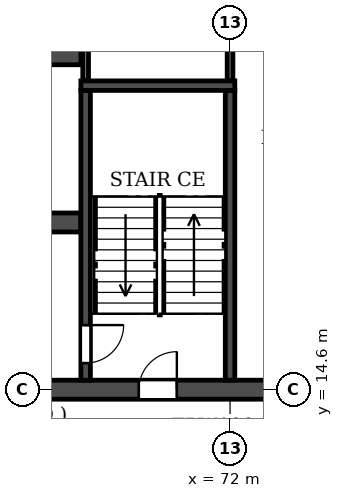
"""IFC4 building model, lengths in metres.
Left out: names, types, materials, properties, quantities, classifications, styles, units other than length and angle.
Written with IfcOpenShell. Run it as: python <this file> out.ifc"""

import sys

from ifc_helpers import new_model, si_unit, direction, frame, frame_2d, origin, place, context, subcontext, project, spatial, rectangle, extrude, element, fill, save


model = new_model("IFC4")
c1 = context("Model", 3, precision=1e-05, world=origin(), true_north=direction((0.0, 1.0)))
c2 = subcontext(c1, "Body", "Model", "MODEL_VIEW")
j1 = project(units=[si_unit("LENGTHUNIT", "METRE"), si_unit("PLANEANGLEUNIT", "RADIAN")], contexts=[c1])
p1 = place(None, origin())
s1 = spatial("IfcSite", under=j1, at=p1, CompositionType="ELEMENT")
p2 = place(p1, origin())
s2 = spatial("IfcBuilding", under=s1, at=p2, CompositionType="ELEMENT")
p3 = place(p2, frame((0.0, 0.0, 92.7)))
s3 = spatial("IfcBuildingStorey", under=s2, at=p3, CompositionType="ELEMENT", Elevation=92.7)
p4 = place(p3, frame((8.6, 14.6, 0.0), z_axis=(0.0, 0.0, 1.0), x_axis=(1.0, 0.0, 0.0)))
e1 = element("IfcWall", 1, at=p4, inside=s3, PredefinedType="SOLIDWALL", context=c2, shape_type="SweptSolid", body=[
    extrude(rectangle(XDim=84.8, YDim=0.5, at=frame_2d((42.4, 0.0))), origin(), (0.0, 0.0, 1.0), 3.06),
])
p5 = place(p4, frame((4.2, 0.0, 0.0)))
e2 = element("IfcOpeningElement", 2, at=p5, cuts=e1, PredefinedType="OPENING", context=c2, shape_type="SweptSolid", body=[
    extrude(rectangle(XDim=1.0, YDim=2.1, at=frame_2d((0.5, 1.05))), frame((0.0, 0.26, 0.0), z_axis=(0.0, -1.0, 0.0), x_axis=(1.0, 0.0, 0.0)), (0.0, 0.0, 1.0), 0.52),
])
p6 = place(p4, frame((10.3, 0.0, 0.0)))
e3 = element("IfcOpeningElement", 3, at=p6, cuts=e1, PredefinedType="OPENING", context=c2, shape_type="SweptSolid", body=[
    extrude(rectangle(XDim=1.0, YDim=2.1, at=frame_2d((0.5, 1.05))), frame((0.0, 0.26, 0.0), z_axis=(0.0, -1.0, 0.0), x_axis=(1.0, 0.0, 0.0)), (0.0, 0.0, 1.0), 0.52),
])
p7 = place(p4, frame((18.2, 0.0, 0.0)))
e4 = element("IfcOpeningElement", 4, at=p7, cuts=e1, PredefinedType="OPENING", context=c2, shape_type="SweptSolid", body=[
    extrude(rectangle(XDim=1.0, YDim=2.1, at=frame_2d((0.5, 1.05))), frame((0.0, 0.26, 0.0), z_axis=(0.0, -1.0, 0.0), x_axis=(1.0, 0.0, 0.0)), (0.0, 0.0, 1.0), 0.52),
])
p8 = place(p4, frame((22.8, 0.0, 0.0)))
e5 = element("IfcOpeningElement", 5, at=p8, cuts=e1, PredefinedType="OPENING", context=c2, shape_type="SweptSolid", body=[
    extrude(rectangle(XDim=1.0, YDim=2.1, at=frame_2d((0.5, 1.05))), frame((0.0, 0.26, 0.0), z_axis=(0.0, -1.0, 0.0), x_axis=(1.0, 0.0, 0.0)), (0.0, 0.0, 1.0), 0.52),
])
p9 = place(p4, frame((34.1, 0.0, 0.0)))
e6 = element("IfcOpeningElement", 6, at=p9, cuts=e1, PredefinedType="OPENING", context=c2, shape_type="SweptSolid", body=[
    extrude(rectangle(XDim=1.0, YDim=2.1, at=frame_2d((0.5, 1.05))), frame((0.0, 0.26, 0.0), z_axis=(0.0, -1.0, 0.0), x_axis=(1.0, 0.0, 0.0)), (0.0, 0.0, 1.0), 0.52),
])
p10 = place(p4, frame((38.0, 0.0, 0.0)))
e7 = element("IfcOpeningElement", 7, at=p10, cuts=e1, PredefinedType="OPENING", context=c2, shape_type="SweptSolid", body=[
    extrude(rectangle(XDim=1.0, YDim=2.1, at=frame_2d((0.5, 1.05))), frame((0.0, 0.26, 0.0), z_axis=(0.0, -1.0, 0.0), x_axis=(1.0, 0.0, 0.0)), (0.0, 0.0, 1.0), 0.52),
])
p11 = place(p4, frame((41.9, 0.0, 0.0)))
e8 = element("IfcOpeningElement", 8, at=p11, cuts=e1, PredefinedType="OPENING", context=c2, shape_type="SweptSolid", body=[
    extrude(rectangle(XDim=1.0, YDim=2.1, at=frame_2d((0.5, 1.05))), frame((0.0, 0.26, 0.0), z_axis=(0.0, -1.0, 0.0), x_axis=(1.0, 0.0, 0.0)), (0.0, 0.0, 1.0), 0.52),
])
p12 = place(p4, frame((47.1, 0.0, 0.0)))
e9 = element("IfcOpeningElement", 9, at=p12, cuts=e1, PredefinedType="OPENING", context=c2, shape_type="SweptSolid", body=[
    extrude(rectangle(XDim=1.0, YDim=2.1, at=frame_2d((0.5, 1.05))), frame((0.0, 0.26, 0.0), z_axis=(0.0, -1.0, 0.0), x_axis=(1.0, 0.0, 0.0)), (0.0, 0.0, 1.0), 0.52),
])
p13 = place(p4, frame((61.0, 0.0, 0.0)))
e10 = element("IfcOpeningElement", 10, at=p13, cuts=e1, PredefinedType="OPENING", context=c2, shape_type="SweptSolid", body=[
    extrude(rectangle(XDim=1.0, YDim=2.1, at=frame_2d((0.5, 1.05))), frame((0.0, 0.26, 0.0), z_axis=(0.0, -1.0, 0.0), x_axis=(1.0, 0.0, 0.0)), (0.0, 0.0, 1.0), 0.52),
])
p14 = place(p4, frame((65.6, 0.0, 0.0)))
e11 = element("IfcOpeningElement", 11, at=p14, cuts=e1, PredefinedType="OPENING", context=c2, shape_type="SweptSolid", body=[
    extrude(rectangle(XDim=1.0, YDim=2.1, at=frame_2d((0.5, 1.05))), frame((0.0, 0.26, 0.0), z_axis=(0.0, -1.0, 0.0), x_axis=(1.0, 0.0, 0.0)), (0.0, 0.0, 1.0), 0.52),
])
p15 = place(p4, frame((73.5, 0.0, 0.0)))
e12 = element("IfcOpeningElement", 12, at=p15, cuts=e1, PredefinedType="OPENING", context=c2, shape_type="SweptSolid", body=[
    extrude(rectangle(XDim=1.0, YDim=2.1, at=frame_2d((0.5, 1.05))), frame((0.0, 0.26, 0.0), z_axis=(0.0, -1.0, 0.0), x_axis=(1.0, 0.0, 0.0)), (0.0, 0.0, 1.0), 0.52),
])
p16 = place(p4, frame((76.25, 0.0, 0.0)))
e13 = element("IfcOpeningElement", 13, at=p16, cuts=e1, PredefinedType="OPENING", context=c2, shape_type="SweptSolid", body=[
    extrude(rectangle(XDim=1.0, YDim=2.1, at=frame_2d((0.5, 1.05))), frame((0.0, 0.26, 0.0), z_axis=(0.0, -1.0, 0.0), x_axis=(1.0, 0.0, 0.0)), (0.0, 0.0, 1.0), 0.52),
])
p17 = place(p4, frame((80.95, 0.0, 0.0)))
e14 = element("IfcOpeningElement", 14, at=p17, cuts=e1, PredefinedType="OPENING", context=c2, shape_type="SweptSolid", body=[
    extrude(rectangle(XDim=1.0, YDim=2.1, at=frame_2d((0.5, 1.05))), frame((0.0, 0.26, 0.0), z_axis=(0.0, -1.0, 0.0), x_axis=(1.0, 0.0, 0.0)), (0.0, 0.0, 1.0), 0.52),
])
p18 = place(p3, frame((33.925, 19.0, 0.0), z_axis=(0.0, 0.0, 1.0), x_axis=(1.0, 0.0, 0.0)))
e15 = element("IfcWall", 15, at=p18, inside=s3, PredefinedType="SOLIDWALL", context=c2, shape_type="SweptSolid", body=[
    extrude(rectangle(XDim=34.15, YDim=0.5, at=frame_2d((17.075, 0.0))), origin(), (0.0, 0.0, 1.0), 3.06),
])
p19 = place(p18, frame((16.175, 0.0, 0.0)))
e16 = element("IfcOpeningElement", 16, at=p19, cuts=e15, PredefinedType="OPENING", context=c2, shape_type="SweptSolid", body=[
    extrude(rectangle(XDim=1.8, YDim=2.1, at=frame_2d((0.9, 1.05))), frame((0.0, 0.26, 0.0), z_axis=(0.0, -1.0, 0.0), x_axis=(1.0, 0.0, 0.0)), (0.0, 0.0, 1.0), 0.52),
])
p20 = place(p18, frame((1.525, 0.0, 0.0)))
e17 = element("IfcOpeningElement", 17, at=p20, cuts=e15, PredefinedType="OPENING", context=c2, shape_type="SweptSolid", body=[
    extrude(rectangle(XDim=1.8, YDim=2.1, at=frame_2d((0.9, 1.05))), frame((0.0, 0.26, 0.0), z_axis=(0.0, -1.0, 0.0), x_axis=(1.0, 0.0, 0.0)), (0.0, 0.0, 1.0), 0.52),
])
p21 = place(p18, frame((8.725, 0.0, 0.0)))
e18 = element("IfcOpeningElement", 18, at=p21, cuts=e15, PredefinedType="OPENING", context=c2, shape_type="SweptSolid", body=[
    extrude(rectangle(XDim=1.1, YDim=2.1, at=frame_2d((0.55, 1.05))), frame((0.0, 0.26, 0.0), z_axis=(0.0, -1.0, 0.0), x_axis=(1.0, 0.0, 0.0)), (0.0, 0.0, 1.0), 0.52),
])
p22 = place(p18, frame((11.325, 0.0, 0.0)))
e19 = element("IfcOpeningElement", 19, at=p22, cuts=e15, PredefinedType="OPENING", context=c2, shape_type="SweptSolid", body=[
    extrude(rectangle(XDim=1.1, YDim=2.1, at=frame_2d((0.55, 1.05))), frame((0.0, 0.26, 0.0), z_axis=(0.0, -1.0, 0.0), x_axis=(1.0, 0.0, 0.0)), (0.0, 0.0, 1.0), 0.52),
])
p23 = place(p18, frame((13.925, 0.0, 0.0)))
e20 = element("IfcOpeningElement", 20, at=p23, cuts=e15, PredefinedType="OPENING", context=c2, shape_type="SweptSolid", body=[
    extrude(rectangle(XDim=1.1, YDim=2.1, at=frame_2d((0.55, 1.05))), frame((0.0, 0.26, 0.0), z_axis=(0.0, -1.0, 0.0), x_axis=(1.0, 0.0, 0.0)), (0.0, 0.0, 1.0), 0.52),
])
p24 = place(p18, frame((19.125, 0.0, 0.0)))
e21 = element("IfcOpeningElement", 21, at=p24, cuts=e15, PredefinedType="OPENING", context=c2, shape_type="SweptSolid", body=[
    extrude(rectangle(XDim=1.1, YDim=2.1, at=frame_2d((0.55, 1.05))), frame((0.0, 0.26, 0.0), z_axis=(0.0, -1.0, 0.0), x_axis=(1.0, 0.0, 0.0)), (0.0, 0.0, 1.0), 0.52),
])
p25 = place(p18, frame((21.725, 0.0, 0.0)))
e22 = element("IfcOpeningElement", 22, at=p25, cuts=e15, PredefinedType="OPENING", context=c2, shape_type="SweptSolid", body=[
    extrude(rectangle(XDim=1.1, YDim=2.1, at=frame_2d((0.55, 1.05))), frame((0.0, 0.26, 0.0), z_axis=(0.0, -1.0, 0.0), x_axis=(1.0, 0.0, 0.0)), (0.0, 0.0, 1.0), 0.52),
])
p26 = place(p18, frame((24.325, 0.0, 0.0)))
e23 = element("IfcOpeningElement", 23, at=p26, cuts=e15, PredefinedType="OPENING", context=c2, shape_type="SweptSolid", body=[
    extrude(rectangle(XDim=1.1, YDim=2.1, at=frame_2d((0.55, 1.05))), frame((0.0, 0.26, 0.0), z_axis=(0.0, -1.0, 0.0), x_axis=(1.0, 0.0, 0.0)), (0.0, 0.0, 1.0), 0.52),
])
p27 = place(p18, frame((30.825, 0.0, 0.0)))
e24 = element("IfcOpeningElement", 24, at=p27, cuts=e15, PredefinedType="OPENING", context=c2, shape_type="SweptSolid", body=[
    extrude(rectangle(XDim=1.8, YDim=2.1, at=frame_2d((0.9, 1.05))), frame((0.0, 0.26, 0.0), z_axis=(0.0, -1.0, 0.0), x_axis=(1.0, 0.0, 0.0)), (0.0, 0.0, 1.0), 0.52),
])
p28 = place(p3, frame((33.925, 23.4, 0.0), z_axis=(0.0, 0.0, 1.0), x_axis=(1.0, 0.0, 0.0)))
e25 = element("IfcWall", 25, at=p28, inside=s3, PredefinedType="SOLIDWALL", context=c2, shape_type="SweptSolid", body=[
    extrude(rectangle(XDim=34.15, YDim=0.5, at=frame_2d((17.075, 0.0))), origin(), (0.0, 0.0, 1.0), 3.06),
])
p29 = place(p28, frame((16.175, 0.0, 0.0)))
e26 = element("IfcOpeningElement", 26, at=p29, cuts=e25, PredefinedType="OPENING", context=c2, shape_type="SweptSolid", body=[
    extrude(rectangle(XDim=1.8, YDim=2.1, at=frame_2d((0.9, 1.05))), frame((0.0, 0.26, 0.0), z_axis=(0.0, -1.0, 0.0), x_axis=(1.0, 0.0, 0.0)), (0.0, 0.0, 1.0), 0.52),
])
p30 = place(p28, frame((11.025, 0.0, 0.0)))
e27 = element("IfcOpeningElement", 27, at=p30, cuts=e25, PredefinedType="OPENING", context=c2, shape_type="SweptSolid", body=[
    extrude(rectangle(XDim=1.1, YDim=2.1, at=frame_2d((0.55, 1.05))), frame((0.0, 0.26, 0.0), z_axis=(0.0, -1.0, 0.0), x_axis=(1.0, 0.0, 0.0)), (0.0, 0.0, 1.0), 0.52),
])
p31 = place(p3, frame((68.2, 14.85, 0.0), z_axis=(0.0, 0.0, 1.0), x_axis=(0.0, 1.0, 0.0)))
e28 = element("IfcWall", 28, at=p31, inside=s3, PredefinedType="SOLIDWALL", context=c2, shape_type="SweptSolid", body=[
    extrude(rectangle(XDim=7.625, YDim=0.25, at=frame_2d((3.812, 0.0))), origin(), (0.0, 0.0, 1.0), 3.06),
])
p32 = place(p31, frame((0.45, 0.0, 0.0)))
e29 = element("IfcOpeningElement", 29, at=p32, cuts=e28, PredefinedType="OPENING", context=c2, shape_type="SweptSolid", body=[
    extrude(rectangle(XDim=1.0, YDim=2.1, at=frame_2d((0.5, 1.05))), frame((0.0, 0.135, 0.0), z_axis=(0.0, -1.0, 0.0), x_axis=(1.0, 0.0, 0.0)), (0.0, 0.0, 1.0), 0.27),
])
p33 = place(p3, frame((72.0, 14.85, 0.0), z_axis=(0.0, 0.0, 1.0), x_axis=(0.0, 1.0, 0.0)))
e30 = element("IfcWall", 30, at=p33, inside=s3, PredefinedType="SOLIDWALL", context=c2, shape_type="SweptSolid", body=[
    extrude(rectangle(XDim=7.625, YDim=0.25, at=frame_2d((3.812, 0.0))), origin(), (0.0, 0.0, 1.0), 3.06),
])
p34 = place(p3, frame((68.075, 22.6, 0.0), z_axis=(0.0, 0.0, 1.0), x_axis=(1.0, 0.0, 0.0)))
e31 = element("IfcWall", 31, at=p34, inside=s3, PredefinedType="SOLIDWALL", context=c2, shape_type="SweptSolid", body=[
    extrude(rectangle(XDim=4.05, YDim=0.25, at=frame_2d((2.025, 0.0))), origin(), (0.0, 0.0, 1.0), 3.06),
])
for number, where, z_axis, x_axis in (
    (32, (68.2, 22.735, 0.0), (0.0, 0.0, 1.0), (0.0, 1.0, 0.0)),
    (33, (72.0, 22.735, 0.0), (0.0, 0.0, 1.0), (0.0, 1.0, 0.0)),
):
    element("IfcWall", number, at=place(p3, frame(where, z_axis=z_axis, x_axis=x_axis)), inside=s3, PredefinedType="PARTITIONING", context=c2, shape_type="SweptSolid", body=[
        extrude(rectangle(XDim=4.805, YDim=0.15, at=frame_2d((2.402, 0.0))), origin(), (0.0, 0.0, 1.0), 3.06),
    ])
p35 = place(p13, origin())
e34 = element("IfcDoor", 34, at=p35, inside=s3, OperationType="SINGLE_SWING_RIGHT", PredefinedType="DOOR", context=c2, shape_type="SweptSolid", body=[
    extrude(rectangle(XDim=1.0, YDim=2.1, at=frame_2d((0.5, 1.05))), frame((0.0, 0.025, 0.0), z_axis=(0.0, -1.0, 0.0), x_axis=(1.0, 0.0, 0.0)), (0.0, 0.0, 1.0), 0.05),
])
fill(e10, e34)
p36 = place(p32, frame((1.0, 0.0, 0.0), z_axis=(0.0, 0.0, 1.0), x_axis=(-1.0, 0.0, 0.0)))
e35 = element("IfcDoor", 35, at=p36, inside=s3, OperationType="SINGLE_SWING_LEFT", PredefinedType="DOOR", context=c2, shape_type="SweptSolid", body=[
    extrude(rectangle(XDim=1.0, YDim=2.1, at=frame_2d((0.5, 1.05))), frame((0.0, 0.025, 0.0), z_axis=(0.0, -1.0, 0.0), x_axis=(1.0, 0.0, 0.0)), (0.0, 0.0, 1.0), 0.05),
])
fill(e29, e35)
save(model, sys.argv[1])
